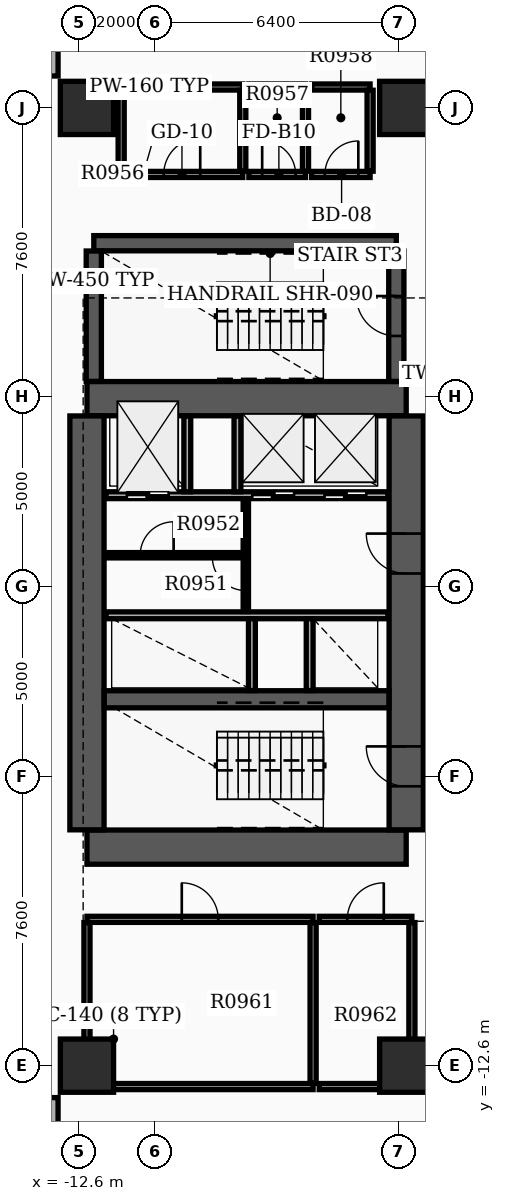
"""IFC4 building model, lengths in metres.
Left out: names, types, materials, properties, quantities, classifications, styles, units other than length and angle.
Written with IfcOpenShell. Run it as: python <this file> out.ifc"""

import sys

from ifc_helpers import new_model, si_unit, direction, frame, frame_2d, origin, origin_2d, place, context, subcontext, project, spatial, rectangle, extrude, element, fill, save


model = new_model("IFC4")
c1 = context("Model", 3, precision=1e-05, world=origin(), true_north=direction((0.0, 1.0)))
c2 = subcontext(c1, "Body", "Model", "MODEL_VIEW")
j1 = project(units=[si_unit("LENGTHUNIT", "METRE"), si_unit("PLANEANGLEUNIT", "RADIAN")], contexts=[c1])
p1 = place(None, origin())
s1 = spatial("IfcSite", under=j1, at=p1, CompositionType="ELEMENT")
p2 = place(p1, origin())
s2 = spatial("IfcBuilding", under=s1, at=p2, CompositionType="ELEMENT")
p3 = place(p2, frame((0.0, 0.0, 63.9)))
s3 = spatial("IfcBuildingStorey", under=s2, at=p3, CompositionType="ELEMENT", Elevation=63.9)
for number, where, z_axis, x_axis in (
    (1, (-12.4, -6.85, 0.0), (0.0, 0.0, 1.0), (1.0, 0.0, 0.0)),
    (2, (-12.4, 4.95, 0.0), (0.0, 0.0, 1.0), (1.0, 0.0, 0.0)),
):
    element("IfcWall", number, at=place(p3, frame(where, z_axis=z_axis, x_axis=x_axis)), inside=s3, PredefinedType="SHEAR", context=c2, shape_type="SweptSolid", body=[
        extrude(rectangle(XDim=8.4, YDim=0.9, at=frame_2d((4.2, 0.0))), origin(), (0.0, 0.0, 1.0), 3.7),
    ])
p4 = place(p3, frame((-12.4, -6.395, 0.0), z_axis=(0.0, 0.0, 1.0), x_axis=(0.0, 1.0, 0.0)))
e3 = element("IfcWall", 3, at=p4, inside=s3, PredefinedType="SHEAR", context=c2, shape_type="SweptSolid", body=[
    extrude(rectangle(XDim=10.89, YDim=0.9, at=frame_2d((5.445, 0.0))), origin(), (0.0, 0.0, 1.0), 3.7),
])
p5 = place(p3, frame((-4.0, -6.395, 0.0), z_axis=(0.0, 0.0, 1.0), x_axis=(0.0, 1.0, 0.0)))
e4 = element("IfcWall", 4, at=p5, inside=s3, PredefinedType="SHEAR", context=c2, shape_type="SweptSolid", body=[
    extrude(rectangle(XDim=10.89, YDim=0.9, at=frame_2d((5.445, 0.0))), origin(), (0.0, 0.0, 1.0), 3.7),
])
p6 = place(p5, frame((1.145, 0.0, 0.0)))
e5 = element("IfcOpeningElement", 5, at=p6, cuts=e4, PredefinedType="OPENING", context=c2, shape_type="SweptSolid", body=[
    extrude(rectangle(XDim=1.05, YDim=2.15, at=frame_2d((0.525, 1.075))), frame((0.0, 0.46, 0.0), z_axis=(0.0, -1.0, 0.0), x_axis=(1.0, 0.0, 0.0)), (0.0, 0.0, 1.0), 0.92),
])
p7 = place(p5, frame((6.745, 0.0, 0.0)))
e6 = element("IfcOpeningElement", 6, at=p7, cuts=e4, PredefinedType="OPENING", context=c2, shape_type="SweptSolid", body=[
    extrude(rectangle(XDim=1.05, YDim=2.15, at=frame_2d((0.525, 1.075))), frame((0.0, 0.46, 0.0), z_axis=(0.0, -1.0, 0.0), x_axis=(1.0, 0.0, 0.0)), (0.0, 0.0, 1.0), 0.92),
])
p8 = place(p3, frame((-11.945, -2.96, 0.0), z_axis=(0.0, 0.0, 1.0), x_axis=(1.0, 0.0, 0.0)))
e7 = element("IfcWall", 7, at=p8, inside=s3, PredefinedType="SHEAR", context=c2, shape_type="SweptSolid", body=[
    extrude(rectangle(XDim=7.49, YDim=0.45, at=frame_2d((3.745, 0.0))), origin(), (0.0, 0.0, 1.0), 3.7),
])
p9 = place(p3, frame((-12.22, 9.04, 0.0), z_axis=(0.0, 0.0, 1.0), x_axis=(1.0, 0.0, 0.0)))
e8 = element("IfcWall", 8, at=p9, inside=s3, PredefinedType="SHEAR", context=c2, shape_type="SweptSolid", body=[
    extrude(rectangle(XDim=7.96, YDim=0.4, at=frame_2d((3.98, 0.0))), origin(), (0.0, 0.0, 1.0), 3.7),
])
p10 = place(p3, frame((-12.22, 5.405, 0.0), z_axis=(0.0, 0.0, 1.0), x_axis=(0.0, 1.0, 0.0)))
e9 = element("IfcWall", 9, at=p10, inside=s3, PredefinedType="SHEAR", context=c2, shape_type="SweptSolid", body=[
    extrude(rectangle(XDim=3.43, YDim=0.4, at=frame_2d((1.715, 0.0))), origin(), (0.0, 0.0, 1.0), 3.7),
])
p11 = place(p3, frame((-4.26, 5.405, 0.0), z_axis=(0.0, 0.0, 1.0), x_axis=(0.0, 1.0, 0.0)))
e10 = element("IfcWall", 10, at=p11, inside=s3, PredefinedType="SHEAR", context=c2, shape_type="SweptSolid", body=[
    extrude(rectangle(XDim=3.43, YDim=0.4, at=frame_2d((1.715, 0.0))), origin(), (0.0, 0.0, 1.0), 3.7),
])
p12 = place(p11, frame((1.195, 0.0, 0.0)))
e11 = element("IfcOpeningElement", 11, at=p12, cuts=e10, PredefinedType="OPENING", context=c2, shape_type="SweptSolid", body=[
    extrude(rectangle(XDim=1.05, YDim=2.15, at=frame_2d((0.525, 1.075))), frame((0.0, 0.21, 0.0), z_axis=(0.0, -1.0, 0.0), x_axis=(1.0, 0.0, 0.0)), (0.0, 0.0, 1.0), 0.42),
])
for number, where, z_axis, x_axis in (
    (12, (-12.4, -12.6, 0.0), (0.0, 0.0, 1.0), (1.0, 0.0, 0.0)),
    (13, (-12.4, 12.6, 0.0), (0.0, 0.0, 1.0), (1.0, 0.0, 0.0)),
    (14, (-4.0, -12.6, 0.0), (0.0, 0.0, 1.0), (1.0, 0.0, 0.0)),
    (15, (-4.0, 12.6, 0.0), (0.0, 0.0, 1.0), (1.0, 0.0, 0.0)),
):
    element("IfcColumn", number, at=place(p3, frame(where, z_axis=z_axis, x_axis=x_axis)), inside=s3, PredefinedType="COLUMN", context=c2, shape_type="SweptSolid", body=[
        extrude(rectangle(XDim=1.4, YDim=1.4, at=origin_2d()), origin(), (0.0, 0.0, 1.0), 3.9),
    ])
for number, where, z_axis, x_axis in (
    (16, (-13.3, 13.44, 0.0), (0.0, 0.0, 1.0), (0.0, 1.0, 0.0)),
    (17, (-13.3, -13.44, 0.0), (0.0, 0.0, 1.0), (0.0, -1.0, 0.0)),
):
    element("IfcWall", number, at=place(p3, frame(where, z_axis=z_axis, x_axis=x_axis)), inside=s3, PredefinedType="STANDARD", context=c2, shape_type="SweptSolid", body=[
        extrude(rectangle(XDim=1.5, YDim=0.28, at=frame_2d((0.75, 0.0))), origin(), (0.0, 0.0, 1.0), 2.91),
    ])
p13 = place(p3, frame((-11.9, 2.41, 0.0), z_axis=(0.0, 0.0, 1.0), x_axis=(1.0, 0.0, 0.0)))
e18 = element("IfcWall", 18, at=p13, inside=s3, PredefinedType="SOLIDWALL", context=c2, shape_type="SweptSolid", body=[
    extrude(rectangle(XDim=7.42, YDim=0.18, at=frame_2d((3.71, 0.0))), origin(), (0.0, 0.0, 1.0), 2.9),
])
p14 = place(p13, frame((0.55, 0.0, 0.0)))
e19 = element("IfcOpeningElement", 19, at=p14, cuts=e18, PredefinedType="OPENING", context=c2, shape_type="SweptSolid", body=[
    extrude(rectangle(XDim=1.1, YDim=2.15, at=frame_2d((0.55, 1.075))), frame((0.0, 0.1, 0.0), z_axis=(0.0, -1.0, 0.0), x_axis=(1.0, 0.0, 0.0)), (0.0, 0.0, 1.0), 0.2),
])
p15 = place(p13, frame((3.85, 0.0, 0.0)))
e20 = element("IfcOpeningElement", 20, at=p15, cuts=e18, PredefinedType="OPENING", context=c2, shape_type="SweptSolid", body=[
    extrude(rectangle(XDim=1.1, YDim=2.15, at=frame_2d((0.55, 1.075))), frame((0.0, 0.1, 0.0), z_axis=(0.0, -1.0, 0.0), x_axis=(1.0, 0.0, 0.0)), (0.0, 0.0, 1.0), 0.2),
])
p16 = place(p13, frame((5.75, 0.0, 0.0)))
e21 = element("IfcOpeningElement", 21, at=p16, cuts=e18, PredefinedType="OPENING", context=c2, shape_type="SweptSolid", body=[
    extrude(rectangle(XDim=1.1, YDim=2.15, at=frame_2d((0.55, 1.075))), frame((0.0, 0.1, 0.0), z_axis=(0.0, -1.0, 0.0), x_axis=(1.0, 0.0, 0.0)), (0.0, 0.0, 1.0), 0.2),
])
p17 = place(p3, frame((-11.9, -0.75, 0.0), z_axis=(0.0, 0.0, 1.0), x_axis=(1.0, 0.0, 0.0)))
e22 = element("IfcWall", 22, at=p17, inside=s3, PredefinedType="SOLIDWALL", context=c2, shape_type="SweptSolid", body=[
    extrude(rectangle(XDim=7.42, YDim=0.18, at=frame_2d((3.71, 0.0))), origin(), (0.0, 0.0, 1.0), 2.9),
])
for number, where, z_axis, x_axis in (
    (23, (-9.76, 2.5, 0.0), (0.0, 0.0, 1.0), (0.0, 1.0, 0.0)),
    (24, (-8.44, 2.5, 0.0), (0.0, 0.0, 1.0), (0.0, 1.0, 0.0)),
):
    element("IfcWall", number, at=place(p3, frame(where, z_axis=z_axis, x_axis=x_axis)), inside=s3, PredefinedType="SOLIDWALL", context=c2, shape_type="SweptSolid", body=[
        extrude(rectangle(XDim=1.99, YDim=0.18, at=frame_2d((0.995, 0.0))), origin(), (0.0, 0.0, 1.0), 2.9),
    ])
for number, where, z_axis, x_axis in (
    (25, (-8.06, -2.73, 0.0), (0.0, 0.0, 1.0), (0.0, 1.0, 0.0)),
    (26, (-6.54, -2.73, 0.0), (0.0, 0.0, 1.0), (0.0, 1.0, 0.0)),
):
    element("IfcWall", number, at=place(p3, frame(where, z_axis=z_axis, x_axis=x_axis)), inside=s3, PredefinedType="SOLIDWALL", context=c2, shape_type="SweptSolid", body=[
        extrude(rectangle(XDim=1.89, YDim=0.18, at=frame_2d((0.945, 0.0))), origin(), (0.0, 0.0, 1.0), 2.9),
    ])
p18 = place(p3, frame((-8.22, -0.65, 0.0), z_axis=(0.0, 0.0, 1.0), x_axis=(0.0, 1.0, 0.0)))
e27 = element("IfcWall", 27, at=p18, inside=s3, PredefinedType="SOLIDWALL", context=c2, shape_type="SweptSolid", body=[
    extrude(rectangle(XDim=2.96, YDim=0.14, at=frame_2d((1.48, 0.0))), origin(), (0.0, 0.0, 1.0), 2.9),
])
p19 = place(p18, frame((0.55, 0.0, 0.0)))
e28 = element("IfcOpeningElement", 28, at=p19, cuts=e27, PredefinedType="OPENING", context=c2, shape_type="SweptSolid", body=[
    extrude(rectangle(XDim=0.88, YDim=2.1, at=frame_2d((0.44, 1.05))), frame((0.0, 0.08, 0.0), z_axis=(0.0, -1.0, 0.0), x_axis=(1.0, 0.0, 0.0)), (0.0, 0.0, 1.0), 0.16),
])
p20 = place(p3, frame((-11.85, 0.83, 0.0), z_axis=(0.0, 0.0, 1.0), x_axis=(1.0, 0.0, 0.0)))
e29 = element("IfcWall", 29, at=p20, inside=s3, PredefinedType="PARTITIONING", context=c2, shape_type="SweptSolid", body=[
    extrude(rectangle(XDim=3.552, YDim=0.14, at=frame_2d((1.776, 0.0))), origin(), (0.0, 0.0, 1.0), 2.9),
])
p21 = place(p20, frame((0.85, 0.0, 0.0)))
e30 = element("IfcOpeningElement", 30, at=p21, cuts=e29, PredefinedType="OPENING", context=c2, shape_type="SweptSolid", body=[
    extrude(rectangle(XDim=0.88, YDim=2.1, at=frame_2d((0.44, 1.05))), frame((0.0, 0.08, 0.0), z_axis=(0.0, -1.0, 0.0), x_axis=(1.0, 0.0, 0.0)), (0.0, 0.0, 1.0), 0.16),
])
p22 = place(p3, frame((-11.5, 10.85, 0.0), z_axis=(0.0, 0.0, 1.0), x_axis=(1.0, 0.0, 0.0)))
e31 = element("IfcWall", 31, at=p22, inside=s3, PredefinedType="PARTITIONING", context=c2, shape_type="SweptSolid", body=[
    extrude(rectangle(XDim=3.2, YDim=0.16, at=frame_2d((1.6, 0.0))), origin(), (0.0, 0.0, 1.0), 2.9),
])
p23 = place(p22, frame((1.12, 0.0, 0.0)))
e32 = element("IfcOpeningElement", 32, at=p23, cuts=e31, PredefinedType="OPENING", context=c2, shape_type="SweptSolid", body=[
    extrude(rectangle(XDim=0.96, YDim=2.15, at=frame_2d((0.48, 1.075))), frame((0.0, 0.09, 0.0), z_axis=(0.0, -1.0, 0.0), x_axis=(1.0, 0.0, 0.0)), (0.0, 0.0, 1.0), 0.18),
])
p24 = place(p3, frame((-11.5, 13.15, 0.0), z_axis=(0.0, 0.0, 1.0), x_axis=(1.0, 0.0, 0.0)))
e33 = element("IfcWall", 33, at=p24, inside=s3, PredefinedType="PARTITIONING", context=c2, shape_type="SweptSolid", body=[
    extrude(rectangle(XDim=3.2, YDim=0.16, at=frame_2d((1.6, 0.0))), origin(), (0.0, 0.0, 1.0), 2.9),
])
for number, where, z_axis, x_axis in (
    (34, (-11.5, 10.935, 0.0), (0.0, 0.0, 1.0), (0.0, 1.0, 0.0)),
    (35, (-8.3, 10.935, 0.0), (0.0, 0.0, 1.0), (0.0, 1.0, 0.0)),
):
    element("IfcWall", number, at=place(p3, frame(where, z_axis=z_axis, x_axis=x_axis)), inside=s3, PredefinedType="PARTITIONING", context=c2, shape_type="SweptSolid", body=[
        extrude(rectangle(XDim=2.13, YDim=0.16, at=frame_2d((1.065, 0.0))), origin(), (0.0, 0.0, 1.0), 2.9),
    ])
p25 = place(p3, frame((-8.14, 10.85, 0.0), z_axis=(0.0, 0.0, 1.0), x_axis=(1.0, 0.0, 0.0)))
e36 = element("IfcWall", 36, at=p25, inside=s3, PredefinedType="PARTITIONING", context=c2, shape_type="SweptSolid", body=[
    extrude(rectangle(XDim=1.49, YDim=0.16, at=frame_2d((0.745, 0.0))), origin(), (0.0, 0.0, 1.0), 2.9),
])
p26 = place(p25, frame((0.35, 0.0, 0.0)))
e37 = element("IfcOpeningElement", 37, at=p26, cuts=e36, PredefinedType="OPENING", context=c2, shape_type="SweptSolid", body=[
    extrude(rectangle(XDim=0.88, YDim=2.1, at=frame_2d((0.44, 1.05))), frame((0.0, 0.09, 0.0), z_axis=(0.0, -1.0, 0.0), x_axis=(1.0, 0.0, 0.0)), (0.0, 0.0, 1.0), 0.18),
])
p27 = place(p3, frame((-8.14, 13.15, 0.0), z_axis=(0.0, 0.0, 1.0), x_axis=(1.0, 0.0, 0.0)))
e38 = element("IfcWall", 38, at=p27, inside=s3, PredefinedType="PARTITIONING", context=c2, shape_type="SweptSolid", body=[
    extrude(rectangle(XDim=1.49, YDim=0.16, at=frame_2d((0.745, 0.0))), origin(), (0.0, 0.0, 1.0), 2.9),
])
p28 = place(p3, frame((-6.65, 10.935, 0.0), z_axis=(0.0, 0.0, 1.0), x_axis=(0.0, 1.0, 0.0)))
e39 = element("IfcWall", 39, at=p28, inside=s3, PredefinedType="PARTITIONING", context=c2, shape_type="SweptSolid", body=[
    extrude(rectangle(XDim=2.13, YDim=0.16, at=frame_2d((1.065, 0.0))), origin(), (0.0, 0.0, 1.0), 2.9),
])
p29 = place(p3, frame((-6.49, 10.85, 0.0), z_axis=(0.0, 0.0, 1.0), x_axis=(1.0, 0.0, 0.0)))
e40 = element("IfcWall", 40, at=p29, inside=s3, PredefinedType="PARTITIONING", context=c2, shape_type="SweptSolid", body=[
    extrude(rectangle(XDim=1.54, YDim=0.16, at=frame_2d((0.77, 0.0))), origin(), (0.0, 0.0, 1.0), 2.9),
])
p30 = place(p29, frame((0.35, 0.0, 0.0)))
e41 = element("IfcOpeningElement", 41, at=p30, cuts=e40, PredefinedType="OPENING", context=c2, shape_type="SweptSolid", body=[
    extrude(rectangle(XDim=0.88, YDim=2.15, at=frame_2d((0.44, 1.075))), frame((0.0, 0.09, 0.0), z_axis=(0.0, -1.0, 0.0), x_axis=(1.0, 0.0, 0.0)), (0.0, 0.0, 1.0), 0.18),
])
p31 = place(p3, frame((-6.49, 13.15, 0.0), z_axis=(0.0, 0.0, 1.0), x_axis=(1.0, 0.0, 0.0)))
e42 = element("IfcWall", 42, at=p31, inside=s3, PredefinedType="PARTITIONING", context=c2, shape_type="SweptSolid", body=[
    extrude(rectangle(XDim=1.54, YDim=0.16, at=frame_2d((0.77, 0.0))), origin(), (0.0, 0.0, 1.0), 2.9),
])
p32 = place(p3, frame((-4.95, 10.935, 0.0), z_axis=(0.0, 0.0, 1.0), x_axis=(0.0, 1.0, 0.0)))
e43 = element("IfcWall", 43, at=p32, inside=s3, PredefinedType="PARTITIONING", context=c2, shape_type="SweptSolid", body=[
    extrude(rectangle(XDim=2.13, YDim=0.16, at=frame_2d((1.065, 0.0))), origin(), (0.0, 0.0, 1.0), 2.9),
])
p33 = place(p3, frame((-12.4, -13.15, 0.0), z_axis=(0.0, 0.0, 1.0), x_axis=(1.0, 0.0, 0.0)))
e44 = element("IfcWall", 44, at=p33, inside=s3, PredefinedType="PARTITIONING", context=c2, shape_type="SweptSolid", body=[
    extrude(rectangle(XDim=5.95, YDim=0.16, at=frame_2d((2.975, 0.0))), origin(), (0.0, 0.0, 1.0), 2.9),
])
p34 = place(p3, frame((-12.4, -8.75, 0.0), z_axis=(0.0, 0.0, 1.0), x_axis=(1.0, 0.0, 0.0)))
e45 = element("IfcWall", 45, at=p34, inside=s3, PredefinedType="PARTITIONING", context=c2, shape_type="SweptSolid", body=[
    extrude(rectangle(XDim=5.95, YDim=0.16, at=frame_2d((2.975, 0.0))), origin(), (0.0, 0.0, 1.0), 2.9),
])
p35 = place(p34, frame((2.495, 0.0, 0.0)))
e46 = element("IfcOpeningElement", 46, at=p35, cuts=e45, PredefinedType="OPENING", context=c2, shape_type="SweptSolid", body=[
    extrude(rectangle(XDim=0.96, YDim=2.15, at=frame_2d((0.48, 1.075))), frame((0.0, 0.09, 0.0), z_axis=(0.0, -1.0, 0.0), x_axis=(1.0, 0.0, 0.0)), (0.0, 0.0, 1.0), 0.18),
])
for number, where, z_axis, x_axis in (
    (47, (-12.4, -13.065, 0.0), (0.0, 0.0, 1.0), (0.0, 1.0, 0.0)),
    (48, (-6.45, -13.065, 0.0), (0.0, 0.0, 1.0), (0.0, 1.0, 0.0)),
):
    element("IfcWall", number, at=place(p3, frame(where, z_axis=z_axis, x_axis=x_axis)), inside=s3, PredefinedType="PARTITIONING", context=c2, shape_type="SweptSolid", body=[
        extrude(rectangle(XDim=4.23, YDim=0.16, at=frame_2d((2.115, 0.0))), origin(), (0.0, 0.0, 1.0), 2.9),
    ])
p36 = place(p3, frame((-6.29, -13.15, 0.0), z_axis=(0.0, 0.0, 1.0), x_axis=(1.0, 0.0, 0.0)))
e49 = element("IfcWall", 49, at=p36, inside=s3, PredefinedType="PARTITIONING", context=c2, shape_type="SweptSolid", body=[
    extrude(rectangle(XDim=2.44, YDim=0.16, at=frame_2d((1.22, 0.0))), origin(), (0.0, 0.0, 1.0), 2.9),
])
p37 = place(p3, frame((-6.29, -8.75, 0.0), z_axis=(0.0, 0.0, 1.0), x_axis=(1.0, 0.0, 0.0)))
e50 = element("IfcWall", 50, at=p37, inside=s3, PredefinedType="PARTITIONING", context=c2, shape_type="SweptSolid", body=[
    extrude(rectangle(XDim=2.44, YDim=0.16, at=frame_2d((1.22, 0.0))), origin(), (0.0, 0.0, 1.0), 2.9),
])
p38 = place(p37, frame((0.74, 0.0, 0.0)))
e51 = element("IfcOpeningElement", 51, at=p38, cuts=e50, PredefinedType="OPENING", context=c2, shape_type="SweptSolid", body=[
    extrude(rectangle(XDim=0.96, YDim=2.15, at=frame_2d((0.48, 1.075))), frame((0.0, 0.09, 0.0), z_axis=(0.0, -1.0, 0.0), x_axis=(1.0, 0.0, 0.0)), (0.0, 0.0, 1.0), 0.18),
])
p39 = place(p3, frame((-3.85, -13.065, 0.0), z_axis=(0.0, 0.0, 1.0), x_axis=(0.0, 1.0, 0.0)))
e52 = element("IfcWall", 52, at=p39, inside=s3, PredefinedType="PARTITIONING", context=c2, shape_type="SweptSolid", body=[
    extrude(rectangle(XDim=4.23, YDim=0.16, at=frame_2d((2.115, 0.0))), origin(), (0.0, 0.0, 1.0), 2.9),
])
p40 = place(p6, origin())
e53 = element("IfcDoor", 53, at=p40, inside=s3, OperationType="SINGLE_SWING_RIGHT", PredefinedType="DOOR", context=c2, shape_type="SweptSolid", body=[
    extrude(rectangle(XDim=1.05, YDim=2.15, at=frame_2d((0.525, 1.075))), frame((0.0, 0.025, 0.0), z_axis=(0.0, -1.0, 0.0), x_axis=(1.0, 0.0, 0.0)), (0.0, 0.0, 1.0), 0.05),
])
fill(e5, e53)
p41 = place(p7, origin())
e54 = element("IfcDoor", 54, at=p41, inside=s3, OperationType="SINGLE_SWING_RIGHT", PredefinedType="DOOR", context=c2, shape_type="SweptSolid", body=[
    extrude(rectangle(XDim=1.05, YDim=2.15, at=frame_2d((0.525, 1.075))), frame((0.0, 0.025, 0.0), z_axis=(0.0, -1.0, 0.0), x_axis=(1.0, 0.0, 0.0)), (0.0, 0.0, 1.0), 0.05),
])
fill(e6, e54)
p42 = place(p12, origin())
e55 = element("IfcDoor", 55, at=p42, inside=s3, OperationType="SINGLE_SWING_RIGHT", PredefinedType="DOOR", context=c2, shape_type="SweptSolid", body=[
    extrude(rectangle(XDim=1.05, YDim=2.15, at=frame_2d((0.525, 1.075))), frame((0.0, 0.025, 0.0), z_axis=(0.0, -1.0, 0.0), x_axis=(1.0, 0.0, 0.0)), (0.0, 0.0, 1.0), 0.05),
])
fill(e11, e55)
p43 = place(p14, origin())
e56 = element("IfcDoor", 56, at=p43, inside=s3, OperationType="DOUBLE_DOOR_SLIDING", PredefinedType="DOOR", context=c2, shape_type="SweptSolid", body=[
    extrude(rectangle(XDim=1.1, YDim=2.15, at=frame_2d((0.55, 1.075))), frame((0.0, 0.025, 0.0), z_axis=(0.0, -1.0, 0.0), x_axis=(1.0, 0.0, 0.0)), (0.0, 0.0, 1.0), 0.05),
])
fill(e19, e56)
p44 = place(p15, origin())
e57 = element("IfcDoor", 57, at=p44, inside=s3, OperationType="DOUBLE_DOOR_SLIDING", PredefinedType="DOOR", context=c2, shape_type="SweptSolid", body=[
    extrude(rectangle(XDim=1.1, YDim=2.15, at=frame_2d((0.55, 1.075))), frame((0.0, 0.025, 0.0), z_axis=(0.0, -1.0, 0.0), x_axis=(1.0, 0.0, 0.0)), (0.0, 0.0, 1.0), 0.05),
])
fill(e20, e57)
p45 = place(p16, origin())
e58 = element("IfcDoor", 58, at=p45, inside=s3, OperationType="DOUBLE_DOOR_SLIDING", PredefinedType="DOOR", context=c2, shape_type="SweptSolid", body=[
    extrude(rectangle(XDim=1.1, YDim=2.15, at=frame_2d((0.55, 1.075))), frame((0.0, 0.025, 0.0), z_axis=(0.0, -1.0, 0.0), x_axis=(1.0, 0.0, 0.0)), (0.0, 0.0, 1.0), 0.05),
])
fill(e21, e58)
p46 = place(p19, origin())
e59 = element("IfcDoor", 59, at=p46, inside=s3, OperationType="SINGLE_SWING_RIGHT", PredefinedType="DOOR", context=c2, shape_type="SweptSolid", body=[
    extrude(rectangle(XDim=0.88, YDim=2.1, at=frame_2d((0.44, 1.05))), frame((0.0, 0.025, 0.0), z_axis=(0.0, -1.0, 0.0), x_axis=(1.0, 0.0, 0.0)), (0.0, 0.0, 1.0), 0.05),
])
fill(e28, e59)
p47 = place(p21, origin())
e60 = element("IfcDoor", 60, at=p47, inside=s3, OperationType="SINGLE_SWING_RIGHT", PredefinedType="DOOR", context=c2, shape_type="SweptSolid", body=[
    extrude(rectangle(XDim=0.88, YDim=2.1, at=frame_2d((0.44, 1.05))), frame((0.0, 0.025, 0.0), z_axis=(0.0, -1.0, 0.0), x_axis=(1.0, 0.0, 0.0)), (0.0, 0.0, 1.0), 0.05),
])
fill(e30, e60)
p48 = place(p23, origin())
e61 = element("IfcDoor", 61, at=p48, inside=s3, OperationType="SINGLE_SWING_RIGHT", PredefinedType="DOOR", context=c2, shape_type="SweptSolid", body=[
    extrude(rectangle(XDim=0.96, YDim=2.15, at=frame_2d((0.48, 1.075))), frame((0.0, 0.025, 0.0), z_axis=(0.0, -1.0, 0.0), x_axis=(1.0, 0.0, 0.0)), (0.0, 0.0, 1.0), 0.05),
])
fill(e32, e61)
p49 = place(p26, origin())
e62 = element("IfcDoor", 62, at=p49, inside=s3, OperationType="SINGLE_SWING_LEFT", PredefinedType="DOOR", context=c2, shape_type="SweptSolid", body=[
    extrude(rectangle(XDim=0.88, YDim=2.1, at=frame_2d((0.44, 1.05))), frame((0.0, 0.025, 0.0), z_axis=(0.0, -1.0, 0.0), x_axis=(1.0, 0.0, 0.0)), (0.0, 0.0, 1.0), 0.05),
])
fill(e37, e62)
p50 = place(p30, origin())
e63 = element("IfcDoor", 63, at=p50, inside=s3, OperationType="SINGLE_SWING_RIGHT", PredefinedType="DOOR", context=c2, shape_type="SweptSolid", body=[
    extrude(rectangle(XDim=0.88, YDim=2.15, at=frame_2d((0.44, 1.075))), frame((0.0, 0.025, 0.0), z_axis=(0.0, -1.0, 0.0), x_axis=(1.0, 0.0, 0.0)), (0.0, 0.0, 1.0), 0.05),
])
fill(e41, e63)
p51 = place(p35, origin())
e64 = element("IfcDoor", 64, at=p51, inside=s3, OperationType="SINGLE_SWING_LEFT", PredefinedType="DOOR", context=c2, shape_type="SweptSolid", body=[
    extrude(rectangle(XDim=0.96, YDim=2.15, at=frame_2d((0.48, 1.075))), frame((0.0, 0.025, 0.0), z_axis=(0.0, -1.0, 0.0), x_axis=(1.0, 0.0, 0.0)), (0.0, 0.0, 1.0), 0.05),
])
fill(e46, e64)
p52 = place(p38, origin())
e65 = element("IfcDoor", 65, at=p52, inside=s3, OperationType="SINGLE_SWING_RIGHT", PredefinedType="DOOR", context=c2, shape_type="SweptSolid", body=[
    extrude(rectangle(XDim=0.96, YDim=2.15, at=frame_2d((0.48, 1.075))), frame((0.0, 0.025, 0.0), z_axis=(0.0, -1.0, 0.0), x_axis=(1.0, 0.0, 0.0)), (0.0, 0.0, 1.0), 0.05),
])
fill(e51, e65)
save(model, sys.argv[1])
